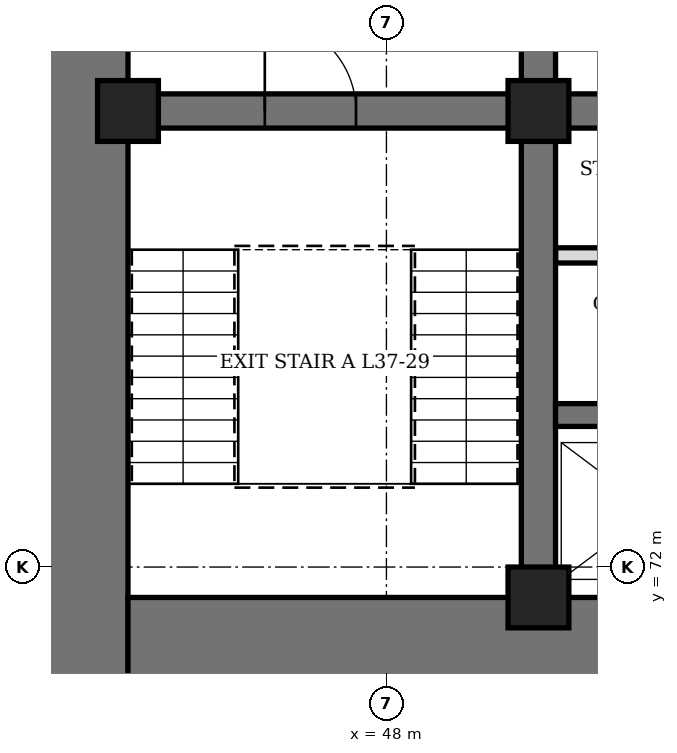
"""IFC4 building model, lengths in metres.
Left out: names, types, materials, properties, quantities, classifications, styles, units other than length and angle.
Written with IfcOpenShell. Run it as: python <this file> out.ifc"""

import sys

from ifc_helpers import new_model, si_unit, direction, frame, frame_2d, origin, origin_2d, place, context, subcontext, project, spatial, rectangle, hollow_rectangle, extrude, element, fill, save


model = new_model("IFC4")
c1 = context("Model", 3, precision=1e-05, world=origin(), true_north=direction((0.0, 1.0)))
c2 = subcontext(c1, "Body", "Model", "MODEL_VIEW")
j1 = project(units=[si_unit("LENGTHUNIT", "METRE"), si_unit("PLANEANGLEUNIT", "RADIAN")], contexts=[c1])
p1 = place(None, origin())
s1 = spatial("IfcSite", under=j1, at=p1, CompositionType="ELEMENT")
p2 = place(p1, origin())
s2 = spatial("IfcBuilding", under=s1, at=p2, CompositionType="ELEMENT")
p3 = place(p2, frame((0.0, 0.0, 166.9)))
s3 = spatial("IfcBuildingStorey", under=s2, at=p3, CompositionType="ELEMENT", Elevation=166.9)
p4 = place(p3, frame((44.0, 70.4, 0.0), z_axis=(0.0, 0.0, 1.0), x_axis=(0.0, 1.0, 0.0)))
e1 = element("IfcWall", 1, at=p4, inside=s3, PredefinedType="SHEAR", context=c2, shape_type="SweptSolid", body=[
    extrude(rectangle(XDim=19.2, YDim=1.2, at=frame_2d((9.6, 0.0))), origin(), (0.0, 0.0, 1.0), 4.2),
])
p5 = place(p4, frame((8.6, 0.0, 0.0)))
e2 = element("IfcOpeningElement", 2, at=p5, cuts=e1, PredefinedType="OPENING", context=c2, shape_type="SweptSolid", body=[
    extrude(rectangle(XDim=2.0, YDim=2.4, at=frame_2d((1.0, 1.2))), frame((0.0, 0.61, 0.0), z_axis=(0.0, -1.0, 0.0), x_axis=(1.0, 0.0, 0.0)), (0.0, 0.0, 1.0), 1.22),
])
p6 = place(p3, frame((44.6, 71.0, 0.0), z_axis=(0.0, 0.0, 1.0), x_axis=(1.0, 0.0, 0.0)))
e3 = element("IfcWall", 3, at=p6, inside=s3, PredefinedType="SHEAR", context=c2, shape_type="SweptSolid", body=[
    extrude(rectangle(XDim=22.8, YDim=1.2, at=frame_2d((11.4, 0.0))), origin(), (0.0, 0.0, 1.0), 4.2),
])
p7 = place(p3, frame((50.0, 71.6, 0.0), z_axis=(0.0, 0.0, 1.0), x_axis=(0.0, 1.0, 0.0)))
e4 = element("IfcWall", 4, at=p7, inside=s3, PredefinedType="SHEAR", context=c2, shape_type="SweptSolid", body=[
    extrude(rectangle(XDim=16.8, YDim=0.45, at=frame_2d((8.4, 0.0))), origin(), (0.0, 0.0, 1.0), 4.2),
])
p8 = place(p7, frame((7.5, 0.0, 0.0)))
e5 = element("IfcOpeningElement", 5, at=p8, cuts=e4, PredefinedType="OPENING", context=c2, shape_type="SweptSolid", body=[
    extrude(rectangle(XDim=1.8, YDim=2.4, at=frame_2d((0.9, 1.2))), frame((0.0, 0.235, 0.0), z_axis=(0.0, -1.0, 0.0), x_axis=(1.0, 0.0, 0.0)), (0.0, 0.0, 1.0), 0.47),
])
p9 = place(p3, frame((44.6, 78.0, 0.0), z_axis=(0.0, 0.0, 1.0), x_axis=(1.0, 0.0, 0.0)))
e6 = element("IfcWall", 6, at=p9, inside=s3, PredefinedType="SHEAR", context=c2, shape_type="SweptSolid", body=[
    extrude(rectangle(XDim=5.175, YDim=0.45, at=frame_2d((2.587, 0.0))), origin(), (0.0, 0.0, 1.0), 4.2),
])
p10 = place(p9, frame((1.8, 0.0, 0.0)))
e7 = element("IfcOpeningElement", 7, at=p10, cuts=e6, PredefinedType="OPENING", context=c2, shape_type="SweptSolid", body=[
    extrude(rectangle(XDim=1.2, YDim=2.1, at=frame_2d((0.6, 1.05))), frame((0.0, 0.235, 0.0), z_axis=(0.0, -1.0, 0.0), x_axis=(1.0, 0.0, 0.0)), (0.0, 0.0, 1.0), 0.47),
])
p11 = place(p3, frame((50.225, 78.0, 0.0), z_axis=(0.0, 0.0, 1.0), x_axis=(1.0, 0.0, 0.0)))
e8 = element("IfcWall", 8, at=p11, inside=s3, PredefinedType="SHEAR", context=c2, shape_type="SweptSolid", body=[
    extrude(rectangle(XDim=11.55, YDim=0.45, at=frame_2d((5.775, 0.0))), origin(), (0.0, 0.0, 1.0), 4.2),
])
p12 = place(p11, frame((0.825, 0.0, 0.0)))
e9 = element("IfcOpeningElement", 9, at=p12, cuts=e8, PredefinedType="OPENING", context=c2, shape_type="SweptSolid", body=[
    extrude(rectangle(XDim=0.9, YDim=2.1, at=frame_2d((0.45, 1.05))), frame((0.0, 0.235, 0.0), z_axis=(0.0, -1.0, 0.0), x_axis=(1.0, 0.0, 0.0)), (0.0, 0.0, 1.0), 0.47),
])
p13 = place(p11, frame((3.825, 0.0, 0.0)))
e10 = element("IfcOpeningElement", 10, at=p13, cuts=e8, PredefinedType="OPENING", context=c2, shape_type="SweptSolid", body=[
    extrude(rectangle(XDim=0.9, YDim=2.1, at=frame_2d((0.45, 1.05))), frame((0.0, 0.235, 0.0), z_axis=(0.0, -1.0, 0.0), x_axis=(1.0, 0.0, 0.0)), (0.0, 0.0, 1.0), 0.47),
])
p14 = place(p11, frame((6.825, 0.0, 0.0)))
e11 = element("IfcOpeningElement", 11, at=p14, cuts=e8, PredefinedType="OPENING", context=c2, shape_type="SweptSolid", body=[
    extrude(rectangle(XDim=0.9, YDim=2.1, at=frame_2d((0.45, 1.05))), frame((0.0, 0.235, 0.0), z_axis=(0.0, -1.0, 0.0), x_axis=(1.0, 0.0, 0.0)), (0.0, 0.0, 1.0), 0.47),
])
p15 = place(p11, frame((9.825, 0.0, 0.0)))
e12 = element("IfcOpeningElement", 12, at=p15, cuts=e8, PredefinedType="OPENING", context=c2, shape_type="SweptSolid", body=[
    extrude(rectangle(XDim=0.9, YDim=2.1, at=frame_2d((0.45, 1.05))), frame((0.0, 0.235, 0.0), z_axis=(0.0, -1.0, 0.0), x_axis=(1.0, 0.0, 0.0)), (0.0, 0.0, 1.0), 0.47),
])
p16 = place(p3, frame((50.225, 74.0, 0.0), z_axis=(0.0, 0.0, 1.0), x_axis=(1.0, 0.0, 0.0)))
e13 = element("IfcWall", 13, at=p16, inside=s3, PredefinedType="SHEAR", context=c2, shape_type="SweptSolid", body=[
    extrude(rectangle(XDim=11.55, YDim=0.3, at=frame_2d((5.775, 0.0))), origin(), (0.0, 0.0, 1.0), 4.2),
])
for number, where, z_axis, x_axis in (
    (14, (44.6, 78.0, 0.0), (0.0, 0.0, 1.0), (1.0, 0.0, 0.0)),
    (15, (50.0, 71.6, 0.0), (0.0, 0.0, 1.0), (1.0, 0.0, 0.0)),
    (16, (50.0, 78.0, 0.0), (0.0, 0.0, 1.0), (1.0, 0.0, 0.0)),
):
    element("IfcColumn", number, at=place(p3, frame(where, z_axis=z_axis, x_axis=x_axis)), inside=s3, PredefinedType="COLUMN", context=c2, shape_type="SweptSolid", body=[
        extrude(hollow_rectangle(XDim=0.8, YDim=0.8, WallThickness=0.1, at=origin_2d()), origin(), (0.0, 0.0, 1.0), 4.2),
    ])
p17 = place(p3, frame((50.225, 76.1, 0.0), z_axis=(0.0, 0.0, 1.0), x_axis=(1.0, 0.0, 0.0)))
e17 = element("IfcWall", 17, at=p17, inside=s3, PredefinedType="PARTITIONING", context=c2, shape_type="SweptSolid", body=[
    extrude(rectangle(XDim=2.55, YDim=0.2, at=frame_2d((1.275, 0.0))), origin(), (0.0, 0.0, 1.0), 4.04),
])
p18 = place(p17, frame((0.825, 0.0, 0.0)))
e18 = element("IfcOpeningElement", 18, at=p18, cuts=e17, PredefinedType="OPENING", context=c2, shape_type="SweptSolid", body=[
    extrude(rectangle(XDim=0.9, YDim=2.1, at=frame_2d((0.45, 1.05))), frame((0.0, 0.11, 0.0), z_axis=(0.0, -1.0, 0.0), x_axis=(1.0, 0.0, 0.0)), (0.0, 0.0, 1.0), 0.22),
])
p19 = place(p10, origin())
e19 = element("IfcDoor", 19, at=p19, inside=s3, OperationType="SINGLE_SWING_LEFT", PredefinedType="DOOR", context=c2, shape_type="SweptSolid", body=[
    extrude(rectangle(XDim=1.2, YDim=2.1, at=frame_2d((0.6, 1.05))), frame((0.0, 0.225, 0.0), z_axis=(0.0, -1.0, 0.0), x_axis=(1.0, 0.0, 0.0)), (0.0, 0.0, 1.0), 0.449),
])
fill(e7, e19)
save(model, sys.argv[1])
